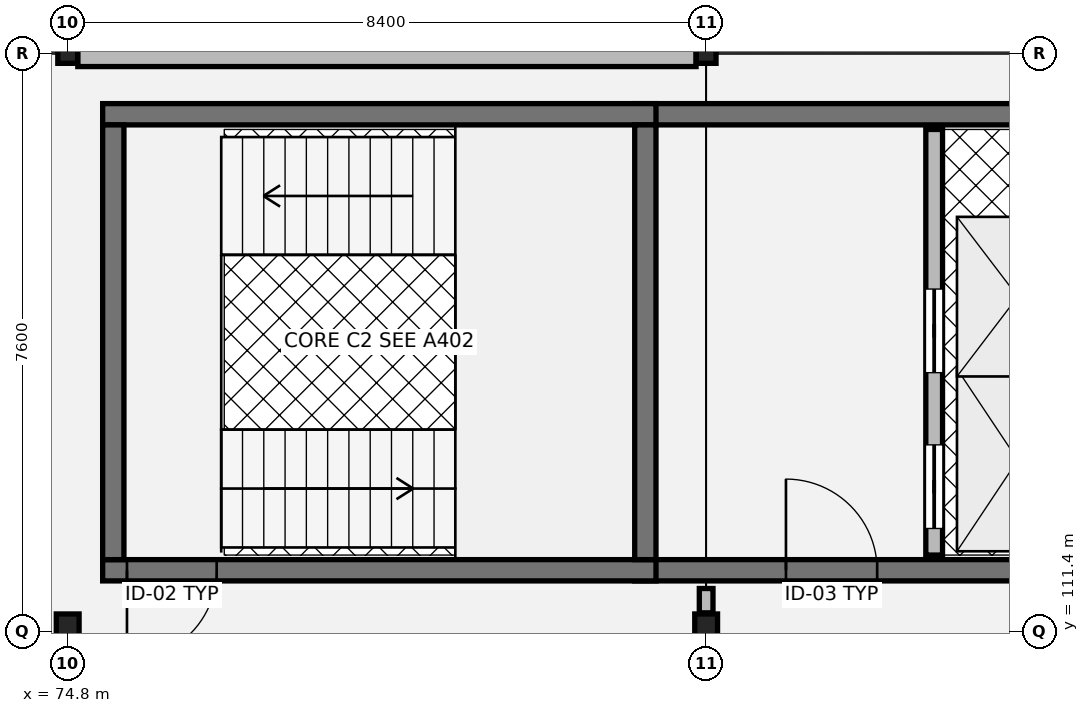
"""IFC4 building model, lengths in metres.
Left out: names, types, materials, properties, quantities, classifications, styles, units other than length and angle.
Written with IfcOpenShell. Run it as: python <this file> out.ifc"""

import sys

from ifc_helpers import new_model, si_unit, direction, frame, frame_2d, origin, origin_2d, place, context, subcontext, project, spatial, rectangle, hollow_rectangle, i_section, extrude, element, fill, save


model = new_model("IFC4")
c1 = context("Model", 3, precision=1e-05, world=origin(), true_north=direction((0.0, 1.0)))
c2 = subcontext(c1, "Body", "Model", "MODEL_VIEW")
j1 = project(units=[si_unit("LENGTHUNIT", "METRE"), si_unit("PLANEANGLEUNIT", "RADIAN")], contexts=[c1])
p1 = place(None, origin())
s1 = spatial("IfcSite", under=j1, at=p1, CompositionType="ELEMENT")
p2 = place(p1, origin())
s2 = spatial("IfcBuilding", under=s1, at=p2, CompositionType="ELEMENT")
p3 = place(p2, frame((0.0, 0.0, 9.18)))
s3 = spatial("IfcBuildingStorey", under=s2, at=p3, CompositionType="ELEMENT", Elevation=9.18)
p4 = place(p3, frame((74.8, 111.4, 0.0), z_axis=(0.0, 0.0, 1.0), x_axis=(1.0, 0.0, 0.0)))
e1 = element("IfcColumn", 1, at=p4, inside=s3, PredefinedType="COLUMN", context=c2, shape_type="SweptSolid", body=[
    extrude(i_section(OverallWidth=0.3, OverallDepth=0.45, WebThickness=0.014, FlangeThickness=0.026, at=origin_2d()), origin(), (0.0, 0.0, 1.0), 4.055),
])
p5 = place(p3, frame((74.8, 119.0, 0.0), z_axis=(0.0, 0.0, 1.0), x_axis=(1.0, 0.0, 0.0)))
e2 = element("IfcColumn", 2, at=p5, inside=s3, PredefinedType="COLUMN", context=c2, shape_type="SweptSolid", body=[
    extrude(hollow_rectangle(XDim=0.26, YDim=0.26, WallThickness=0.012, at=origin_2d()), origin(), (0.0, 0.0, 1.0), 4.055),
])
p6 = place(p3, frame((83.2, 111.4, 0.0), z_axis=(0.0, 0.0, 1.0), x_axis=(1.0, 0.0, 0.0)))
e3 = element("IfcColumn", 3, at=p6, inside=s3, PredefinedType="COLUMN", context=c2, shape_type="SweptSolid", body=[
    extrude(i_section(OverallWidth=0.3, OverallDepth=0.45, WebThickness=0.014, FlangeThickness=0.026, at=origin_2d()), origin(), (0.0, 0.0, 1.0), 4.055),
])
p7 = place(p3, frame((83.2, 119.0, 0.0), z_axis=(0.0, 0.0, 1.0), x_axis=(1.0, 0.0, 0.0)))
e4 = element("IfcColumn", 4, at=p7, inside=s3, PredefinedType="COLUMN", context=c2, shape_type="SweptSolid", body=[
    extrude(hollow_rectangle(XDim=0.26, YDim=0.26, WallThickness=0.012, at=origin_2d()), origin(), (0.0, 0.0, 1.0), 4.055),
])
p8 = place(p3, frame((83.067, 119.0, 0.0), z_axis=(0.0, 0.0, 1.0), x_axis=(-1.0, 0.0, 0.0)))
e5 = element("IfcWall", 5, at=p8, inside=s3, PredefinedType="SOLIDWALL", context=c2, shape_type="SweptSolid", body=[
    extrude(rectangle(XDim=8.134, YDim=0.345, at=frame_2d((4.067, 0.0))), origin(), (0.0, 0.0, 1.0), 3.48),
])
p9 = place(p3, frame((82.26, 112.2, 0.0), z_axis=(0.0, 0.0, 1.0), x_axis=(1.0, 0.0, 0.0)))
e6 = element("IfcWall", 6, at=p9, inside=s3, PredefinedType="SHEAR", context=c2, shape_type="SweptSolid", body=[
    extrude(rectangle(XDim=6.33, YDim=0.28, at=frame_2d((3.165, 0.0))), origin(), (0.0, 0.0, 1.0), 3.845),
])
p10 = place(p9, frame((1.99, 0.0, 0.0)))
e7 = element("IfcOpeningElement", 7, at=p10, cuts=e6, PredefinedType="OPENING", context=c2, shape_type="SweptSolid", body=[
    extrude(rectangle(XDim=1.2, YDim=2.16, at=frame_2d((0.6, 1.08))), frame((0.0, 0.15, 0.0), z_axis=(0.0, -1.0, 0.0), x_axis=(1.0, 0.0, 0.0)), (0.0, 0.0, 1.0), 0.3),
])
p11 = place(p3, frame((88.59, 118.2, 0.0), z_axis=(0.0, 0.0, 1.0), x_axis=(-1.0, 0.0, 0.0)))
e8 = element("IfcWall", 8, at=p11, inside=s3, PredefinedType="SHEAR", context=c2, shape_type="SweptSolid", body=[
    extrude(rectangle(XDim=6.33, YDim=0.28, at=frame_2d((3.165, 0.0))), origin(), (0.0, 0.0, 1.0), 3.845),
])
p12 = place(p3, frame((86.2, 112.4, 0.0), z_axis=(0.0, 0.0, 1.0), x_axis=(0.0, 1.0, 0.0)))
e9 = element("IfcWall", 9, at=p12, inside=s3, PredefinedType="SOLIDWALL", context=c2, shape_type="SweptSolid", body=[
    extrude(rectangle(XDim=5.6, YDim=0.22, at=frame_2d((2.8, 0.0))), origin(), (0.0, 0.0, 1.0), 3.845),
])
p13 = place(p12, frame((0.35, 0.0, 0.0)))
e10 = element("IfcOpeningElement", 10, at=p13, cuts=e9, PredefinedType="OPENING", context=c2, shape_type="SweptSolid", body=[
    extrude(rectangle(XDim=1.1, YDim=2.15, at=frame_2d((0.55, 1.075))), frame((0.0, 0.12, 0.0), z_axis=(0.0, -1.0, 0.0), x_axis=(1.0, 0.0, 0.0)), (0.0, 0.0, 1.0), 0.24),
])
p14 = place(p12, frame((2.4, 0.0, 0.0)))
e11 = element("IfcOpeningElement", 11, at=p14, cuts=e9, PredefinedType="OPENING", context=c2, shape_type="SweptSolid", body=[
    extrude(rectangle(XDim=1.1, YDim=2.15, at=frame_2d((0.55, 1.075))), frame((0.0, 0.12, 0.0), z_axis=(0.0, -1.0, 0.0), x_axis=(1.0, 0.0, 0.0)), (0.0, 0.0, 1.0), 0.24),
])
p15 = place(p3, frame((75.26, 112.2, 0.0), z_axis=(0.0, 0.0, 1.0), x_axis=(1.0, 0.0, 0.0)))
e12 = element("IfcWall", 12, at=p15, inside=s3, PredefinedType="SHEAR", context=c2, shape_type="SweptSolid", body=[
    extrude(rectangle(XDim=7.28, YDim=0.28, at=frame_2d((3.64, 0.0))), origin(), (0.0, 0.0, 1.0), 3.845),
])
p16 = place(p15, frame((0.32, 0.0, 0.0)))
e13 = element("IfcOpeningElement", 13, at=p16, cuts=e12, PredefinedType="OPENING", context=c2, shape_type="SweptSolid", body=[
    extrude(rectangle(XDim=1.18, YDim=2.18, at=frame_2d((0.59, 1.09))), frame((0.0, 0.15, 0.0), z_axis=(0.0, -1.0, 0.0), x_axis=(1.0, 0.0, 0.0)), (0.0, 0.0, 1.0), 0.3),
])
p17 = place(p3, frame((75.26, 118.2, 0.0), z_axis=(0.0, 0.0, 1.0), x_axis=(1.0, 0.0, 0.0)))
e14 = element("IfcWall", 14, at=p17, inside=s3, PredefinedType="SHEAR", context=c2, shape_type="SweptSolid", body=[
    extrude(rectangle(XDim=7.28, YDim=0.28, at=frame_2d((3.64, 0.0))), origin(), (0.0, 0.0, 1.0), 3.845),
])
for number, where, z_axis, x_axis in (
    (15, (75.4, 112.34, 0.0), (0.0, 0.0, 1.0), (0.0, 1.0, 0.0)),
    (16, (82.4, 112.34, 0.0), (0.0, 0.0, 1.0), (0.0, 1.0, 0.0)),
):
    element("IfcWall", number, at=place(p3, frame(where, z_axis=z_axis, x_axis=x_axis)), inside=s3, PredefinedType="SHEAR", context=c2, shape_type="SweptSolid", body=[
        extrude(rectangle(XDim=5.72, YDim=0.28, at=frame_2d((2.86, 0.0))), origin(), (0.0, 0.0, 1.0), 3.845),
    ])
p18 = place(p3, frame((83.2, 111.64, 0.0), z_axis=(0.0, 0.0, 1.0), x_axis=(0.0, 1.0, 0.0)))
e17 = element("IfcWall", 17, at=p18, inside=s3, PredefinedType="PARTITIONING", context=c2, shape_type="SweptSolid", body=[
    extrude(rectangle(XDim=0.32, YDim=0.18, at=frame_2d((0.16, 0.0))), origin(), (0.0, 0.0, 1.0), 3.18),
])
p19 = place(p10, origin())
e18 = element("IfcDoor", 18, at=p19, inside=s3, OperationType="SINGLE_SWING_LEFT", PredefinedType="DOOR", context=c2, shape_type="SweptSolid", body=[
    extrude(rectangle(XDim=1.2, YDim=2.16, at=frame_2d((0.6, 1.08))), frame((0.0, 0.025, 0.0), z_axis=(0.0, -1.0, 0.0), x_axis=(1.0, 0.0, 0.0)), (0.0, 0.0, 1.0), 0.05),
])
fill(e7, e18)
p20 = place(p13, origin())
e19 = element("IfcDoor", 19, at=p20, inside=s3, OperationType="SLIDING_TO_LEFT", PredefinedType="DOOR", context=c2, shape_type="SweptSolid", body=[
    extrude(rectangle(XDim=1.1, YDim=2.15, at=frame_2d((0.55, 1.075))), frame((0.0, 0.025, 0.0), z_axis=(0.0, -1.0, 0.0), x_axis=(1.0, 0.0, 0.0)), (0.0, 0.0, 1.0), 0.05),
])
fill(e10, e19)
p21 = place(p14, origin())
e20 = element("IfcDoor", 20, at=p21, inside=s3, OperationType="SLIDING_TO_LEFT", PredefinedType="DOOR", context=c2, shape_type="SweptSolid", body=[
    extrude(rectangle(XDim=1.1, YDim=2.15, at=frame_2d((0.55, 1.075))), frame((0.0, 0.025, 0.0), z_axis=(0.0, -1.0, 0.0), x_axis=(1.0, 0.0, 0.0)), (0.0, 0.0, 1.0), 0.05),
])
fill(e11, e20)
p22 = place(p16, origin())
e21 = element("IfcDoor", 21, at=p22, inside=s3, OperationType="SINGLE_SWING_RIGHT", PredefinedType="DOOR", context=c2, shape_type="SweptSolid", body=[
    extrude(rectangle(XDim=1.18, YDim=2.18, at=frame_2d((0.59, 1.09))), frame((0.0, 0.025, 0.0), z_axis=(0.0, -1.0, 0.0), x_axis=(1.0, 0.0, 0.0)), (0.0, 0.0, 1.0), 0.05),
])
fill(e13, e21)
save(model, sys.argv[1])
